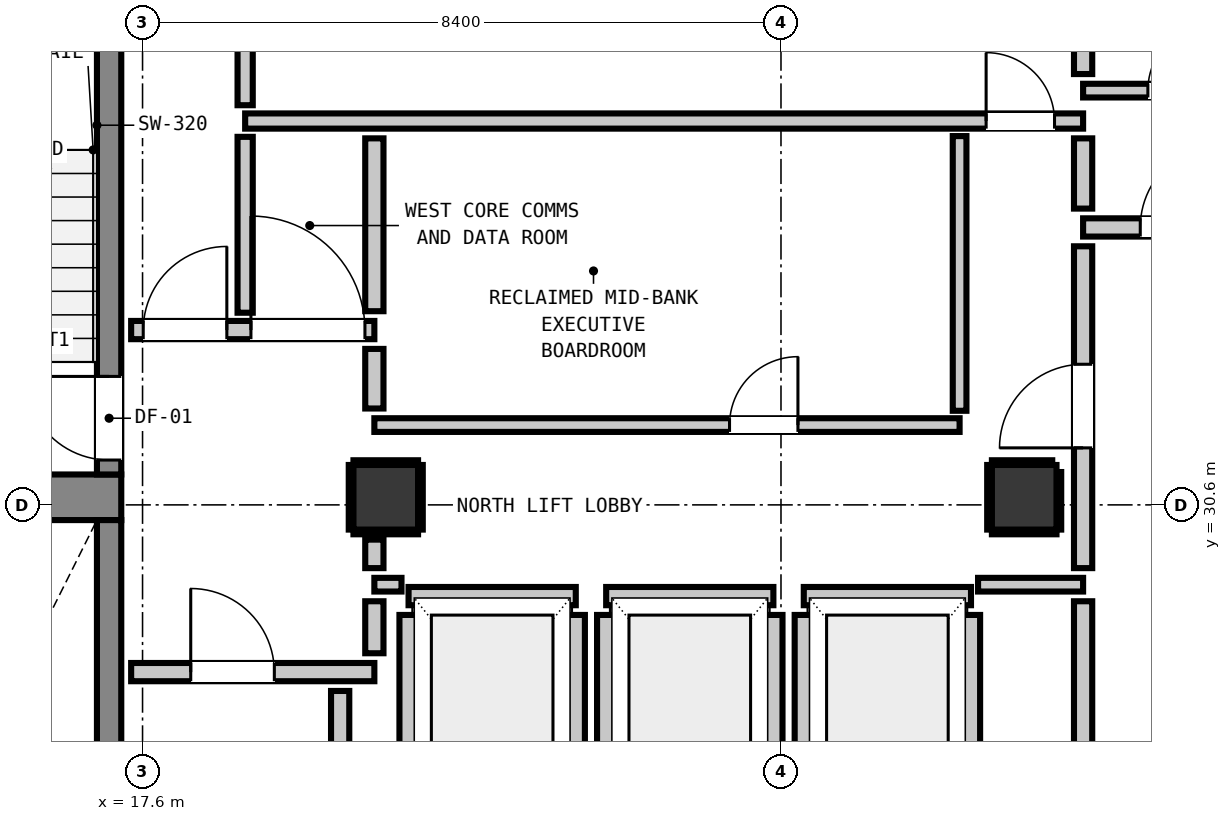
"""IFC4 building model, lengths in metres.
Left out: names, types, materials, properties, quantities, classifications, styles, units other than length and angle.
Written with IfcOpenShell. Run it as: python <this file> out.ifc"""

import sys

from ifc_helpers import new_model, si_unit, direction, frame, frame_2d, origin, origin_2d, place, context, subcontext, project, spatial, rectangle, extrude, element, fill, save


model = new_model("IFC4")
c1 = context("Model", 3, precision=1e-05, world=origin(), true_north=direction((0.0, 1.0)))
c2 = subcontext(c1, "Body", "Model", "MODEL_VIEW")
j1 = project(units=[si_unit("LENGTHUNIT", "METRE"), si_unit("PLANEANGLEUNIT", "RADIAN")], contexts=[c1])
p1 = place(None, origin())
s1 = spatial("IfcSite", under=j1, at=p1, CompositionType="ELEMENT")
p2 = place(p1, origin())
s2 = spatial("IfcBuilding", under=s1, at=p2, CompositionType="ELEMENT")
p3 = place(p2, frame((0.0, 0.0, 190.16)))
s3 = spatial("IfcBuildingStorey", under=s2, at=p3, CompositionType="ELEMENT", Elevation=190.16)
p4 = place(p3, frame((13.78, 30.7, 0.0), z_axis=(0.0, 0.0, 1.0), x_axis=(1.0, 0.0, 0.0)))
e1 = element("IfcWall", 1, at=p4, inside=s3, PredefinedType="SHEAR", context=c2, shape_type="SweptSolid", body=[
    extrude(rectangle(XDim=3.54, YDim=0.6, at=frame_2d((1.77, 0.0))), origin(), (0.0, 0.0, 1.0), 3.32),
])
p5 = place(p3, frame((17.16, 31.0, 0.0), z_axis=(0.0, 0.0, 1.0), x_axis=(0.0, 1.0, 0.0)))
e2 = element("IfcWall", 2, at=p5, inside=s3, PredefinedType="SHEAR", context=c2, shape_type="SweptSolid", body=[
    extrude(rectangle(XDim=7.8, YDim=0.32, at=frame_2d((3.9, 0.0))), origin(), (0.0, 0.0, 1.0), 3.32),
])
p6 = place(p5, frame((0.19, 0.0, 0.0)))
e3 = element("IfcOpeningElement", 3, at=p6, cuts=e2, PredefinedType="OPENING", context=c2, shape_type="SweptSolid", body=[
    extrude(rectangle(XDim=1.1, YDim=2.15, at=frame_2d((0.55, 1.075))), frame((0.0, 0.17, 0.0), z_axis=(0.0, -1.0, 0.0), x_axis=(1.0, 0.0, 0.0)), (0.0, 0.0, 1.0), 0.34),
])
p7 = place(p3, frame((17.16, 22.4, 0.0), z_axis=(0.0, 0.0, 1.0), x_axis=(0.0, 1.0, 0.0)))
e4 = element("IfcWall", 4, at=p7, inside=s3, PredefinedType="SHEAR", context=c2, shape_type="SweptSolid", body=[
    extrude(rectangle(XDim=8.0, YDim=0.32, at=frame_2d((4.0, 0.0))), origin(), (0.0, 0.0, 1.0), 3.32),
])
p8 = place(p7, frame((0.39, 0.0, 0.0)))
e5 = element("IfcOpeningElement", 5, at=p8, cuts=e4, PredefinedType="OPENING", context=c2, shape_type="SweptSolid", body=[
    extrude(rectangle(XDim=1.1, YDim=2.15, at=frame_2d((0.55, 1.075))), frame((0.0, 0.17, 0.0), z_axis=(0.0, -1.0, 0.0), x_axis=(1.0, 0.0, 0.0)), (0.0, 0.0, 1.0), 0.34),
])
for number, where, z_axis, x_axis in (
    (6, (20.8, 30.7, 0.0), (0.0, 0.0, 1.0), (1.0, 0.0, 0.0)),
    (7, (29.2, 30.7, 0.0), (0.0, 0.0, 1.0), (1.0, 0.0, 0.0)),
):
    element("IfcColumn", number, at=place(p3, frame(where, z_axis=z_axis, x_axis=x_axis)), inside=s3, PredefinedType="COLUMN", context=c2, shape_type="SweptSolid", body=[
        extrude(rectangle(XDim=0.85, YDim=0.85, at=origin_2d()), origin(), (0.0, 0.0, 1.0), 3.32),
    ])
p9 = place(p3, frame((21.1, 29.4, 0.0), z_axis=(0.0, 0.0, 1.0), x_axis=(1.0, 0.0, 0.0)))
e8 = element("IfcWall", 8, at=p9, inside=s3, PredefinedType="PARTITIONING", context=c2, shape_type="SweptSolid", body=[
    extrude(rectangle(XDim=2.2, YDim=0.24, at=frame_2d((1.1, 0.0))), origin(), (0.0, 0.0, 1.0), 3.1),
])
p10 = place(p3, frame((21.1, 27.048, 0.0), z_axis=(0.0, 0.0, 1.0), x_axis=(0.0, 1.0, 0.0)))
e9 = element("IfcWall", 9, at=p10, inside=s3, PredefinedType="PARTITIONING", context=c2, shape_type="SweptSolid", body=[
    extrude(rectangle(XDim=2.104, YDim=0.24, at=frame_2d((1.052, 0.0))), origin(), (0.0, 0.0, 1.0), 2.335),
])
p11 = place(p3, frame((23.3, 27.048, 0.0), z_axis=(0.0, 0.0, 1.0), x_axis=(0.0, 1.0, 0.0)))
e10 = element("IfcWall", 10, at=p11, inside=s3, PredefinedType="PARTITIONING", context=c2, shape_type="SweptSolid", body=[
    extrude(rectangle(XDim=2.104, YDim=0.24, at=frame_2d((1.052, 0.0))), origin(), (0.0, 0.0, 1.0), 3.1),
])
p12 = place(p3, frame((23.7, 29.4, 0.0), z_axis=(0.0, 0.0, 1.0), x_axis=(1.0, 0.0, 0.0)))
e11 = element("IfcWall", 11, at=p12, inside=s3, PredefinedType="PARTITIONING", context=c2, shape_type="SweptSolid", body=[
    extrude(rectangle(XDim=2.2, YDim=0.24, at=frame_2d((1.1, 0.0))), origin(), (0.0, 0.0, 1.0), 3.1),
])
for number, where, z_axis, x_axis in (
    (12, (23.7, 27.048, 0.0), (0.0, 0.0, 1.0), (0.0, 1.0, 0.0)),
    (13, (25.9, 27.048, 0.0), (0.0, 0.0, 1.0), (0.0, 1.0, 0.0)),
):
    element("IfcWall", number, at=place(p3, frame(where, z_axis=z_axis, x_axis=x_axis)), inside=s3, PredefinedType="PARTITIONING", context=c2, shape_type="SweptSolid", body=[
        extrude(rectangle(XDim=2.104, YDim=0.24, at=frame_2d((1.052, 0.0))), origin(), (0.0, 0.0, 1.0), 3.1),
    ])
p13 = place(p3, frame((26.3, 29.4, 0.0), z_axis=(0.0, 0.0, 1.0), x_axis=(1.0, 0.0, 0.0)))
e14 = element("IfcWall", 14, at=p13, inside=s3, PredefinedType="PARTITIONING", context=c2, shape_type="SweptSolid", body=[
    extrude(rectangle(XDim=2.2, YDim=0.24, at=frame_2d((1.1, 0.0))), origin(), (0.0, 0.0, 1.0), 3.1),
])
p14 = place(p3, frame((26.3, 27.048, 0.0), z_axis=(0.0, 0.0, 1.0), x_axis=(0.0, 1.0, 0.0)))
e15 = element("IfcWall", 15, at=p14, inside=s3, PredefinedType="PARTITIONING", context=c2, shape_type="SweptSolid", body=[
    extrude(rectangle(XDim=2.104, YDim=0.24, at=frame_2d((1.052, 0.0))), origin(), (0.0, 0.0, 1.0), 3.1),
])
p15 = place(p3, frame((28.5, 27.33, 0.0), z_axis=(0.0, 0.0, 1.0), x_axis=(0.0, 1.0, 0.0)))
e16 = element("IfcWall", 16, at=p15, inside=s3, PredefinedType="PARTITIONING", context=c2, shape_type="SweptSolid", body=[
    extrude(rectangle(XDim=1.822, YDim=0.24, at=frame_2d((0.911, 0.0))), origin(), (0.0, 0.0, 1.0), 3.1),
])
p16 = place(p3, frame((17.45, 28.4, 0.0), z_axis=(0.0, 0.0, 1.0), x_axis=(1.0, 0.0, 0.0)))
e17 = element("IfcWall", 17, at=p16, inside=s3, PredefinedType="PARTITIONING", context=c2, shape_type="SweptSolid", body=[
    extrude(rectangle(XDim=3.2, YDim=0.24, at=frame_2d((1.6, 0.0))), origin(), (0.0, 0.0, 1.0), 3.1),
])
p17 = place(p16, frame((0.784, 0.0, 0.0)))
e18 = element("IfcOpeningElement", 18, at=p17, cuts=e17, PredefinedType="OPENING", context=c2, shape_type="SweptSolid", body=[
    extrude(rectangle(XDim=1.1, YDim=2.15, at=frame_2d((0.55, 1.075))), frame((0.0, 0.13, 0.0), z_axis=(0.0, -1.0, 0.0), x_axis=(1.0, 0.0, 0.0)), (0.0, 0.0, 1.0), 0.26),
])
p18 = place(p3, frame((17.45, 32.9, 0.0), z_axis=(0.0, 0.0, 1.0), x_axis=(1.0, 0.0, 0.0)))
e19 = element("IfcWall", 19, at=p18, inside=s3, PredefinedType="PARTITIONING", context=c2, shape_type="SweptSolid", body=[
    extrude(rectangle(XDim=3.2, YDim=0.24, at=frame_2d((1.6, 0.0))), origin(), (0.0, 0.0, 1.0), 3.1),
])
p19 = place(p18, frame((0.159, 0.0, 0.0)))
e20 = element("IfcOpeningElement", 20, at=p19, cuts=e19, PredefinedType="OPENING", context=c2, shape_type="SweptSolid", body=[
    extrude(rectangle(XDim=1.1, YDim=2.15, at=frame_2d((0.55, 1.075))), frame((0.0, 0.13, 0.0), z_axis=(0.0, -1.0, 0.0), x_axis=(1.0, 0.0, 0.0)), (0.0, 0.0, 1.0), 0.26),
])
p20 = place(p18, frame((1.576, 0.0, 0.0)))
e21 = element("IfcOpeningElement", 21, at=p20, cuts=e19, PredefinedType="OPENING", context=c2, shape_type="SweptSolid", body=[
    extrude(rectangle(XDim=1.5, YDim=2.15, at=frame_2d((0.75, 1.075))), frame((0.0, 0.13, 0.0), z_axis=(0.0, -1.0, 0.0), x_axis=(1.0, 0.0, 0.0)), (0.0, 0.0, 1.0), 0.26),
])
p21 = place(p3, frame((29.975, 34.25, 0.0), z_axis=(0.0, 0.0, 1.0), x_axis=(1.0, 0.0, 0.0)))
e22 = element("IfcWall", 22, at=p21, inside=s3, PredefinedType="PARTITIONING", context=c2, shape_type="SweptSolid", body=[
    extrude(rectangle(XDim=2.475, YDim=0.24, at=frame_2d((1.237, 0.0))), origin(), (0.0, 0.0, 1.0), 3.1),
])
p22 = place(p21, frame((0.752, 0.0, 0.0)))
e23 = element("IfcOpeningElement", 23, at=p22, cuts=e22, PredefinedType="OPENING", context=c2, shape_type="SweptSolid", body=[
    extrude(rectangle(XDim=1.1, YDim=2.15, at=frame_2d((0.55, 1.075))), frame((0.0, 0.13, 0.0), z_axis=(0.0, -1.0, 0.0), x_axis=(1.0, 0.0, 0.0)), (0.0, 0.0, 1.0), 0.26),
])
p23 = place(p3, frame((18.95, 35.65, 0.0), z_axis=(0.0, 0.0, 1.0), x_axis=(1.0, 0.0, 0.0)))
e24 = element("IfcWall", 24, at=p23, inside=s3, PredefinedType="PARTITIONING", context=c2, shape_type="SweptSolid", body=[
    extrude(rectangle(XDim=11.025, YDim=0.2, at=frame_2d((5.513, 0.0))), origin(), (0.0, 0.0, 1.0), 3.1),
])
p24 = place(p23, frame((9.749, 0.0, 0.0)))
e25 = element("IfcOpeningElement", 25, at=p24, cuts=e24, PredefinedType="OPENING", context=c2, shape_type="SweptSolid", body=[
    extrude(rectangle(XDim=0.9, YDim=2.1, at=frame_2d((0.45, 1.05))), frame((0.0, 0.11, 0.0), z_axis=(0.0, -1.0, 0.0), x_axis=(1.0, 0.0, 0.0)), (0.0, 0.0, 1.0), 0.22),
])
p25 = place(p3, frame((20.65, 29.55, 0.0), z_axis=(0.0, 0.0, 1.0), x_axis=(1.0, 0.0, 0.0)))
e26 = element("IfcWall", 26, at=p25, inside=s3, PredefinedType="PARTITIONING", context=c2, shape_type="SweptSolid", body=[
    extrude(rectangle(XDim=0.357, YDim=0.18, at=frame_2d((0.179, 0.0))), origin(), (0.0, 0.0, 1.0), 3.1),
])
p26 = place(p3, frame((28.593, 29.55, 0.0), z_axis=(0.0, 0.0, 1.0), x_axis=(1.0, 0.0, 0.0)))
e27 = element("IfcWall", 27, at=p26, inside=s3, PredefinedType="PARTITIONING", context=c2, shape_type="SweptSolid", body=[
    extrude(rectangle(XDim=1.382, YDim=0.18, at=frame_2d((0.691, 0.0))), origin(), (0.0, 0.0, 1.0), 3.1),
])
p27 = place(p3, frame((20.65, 31.65, 0.0), z_axis=(0.0, 0.0, 1.0), x_axis=(1.0, 0.0, 0.0)))
e28 = element("IfcWall", 28, at=p27, inside=s3, PredefinedType="PARTITIONING", context=c2, shape_type="SweptSolid", body=[
    extrude(rectangle(XDim=7.7, YDim=0.18, at=frame_2d((3.85, 0.0))), origin(), (0.0, 0.0, 1.0), 3.1),
])
p28 = place(p27, frame((4.673, 0.0, 0.0)))
e29 = element("IfcOpeningElement", 29, at=p28, cuts=e28, PredefinedType="OPENING", context=c2, shape_type="SweptSolid", body=[
    extrude(rectangle(XDim=0.9, YDim=2.1, at=frame_2d((0.45, 1.05))), frame((0.0, 0.1, 0.0), z_axis=(0.0, -1.0, 0.0), x_axis=(1.0, 0.0, 0.0)), (0.0, 0.0, 1.0), 0.2),
])
p29 = place(p3, frame((29.975, 36.05, 0.0), z_axis=(0.0, 0.0, 1.0), x_axis=(1.0, 0.0, 0.0)))
e30 = element("IfcWall", 30, at=p29, inside=s3, PredefinedType="PARTITIONING", context=c2, shape_type="SweptSolid", body=[
    extrude(rectangle(XDim=2.505, YDim=0.18, at=frame_2d((1.252, 0.0))), origin(), (0.0, 0.0, 1.0), 3.1),
])
p30 = place(p29, frame((0.852, 0.0, 0.0)))
e31 = element("IfcOpeningElement", 31, at=p30, cuts=e30, PredefinedType="OPENING", context=c2, shape_type="SweptSolid", body=[
    extrude(rectangle(XDim=0.9, YDim=2.1, at=frame_2d((0.45, 1.05))), frame((0.0, 0.1, 0.0), z_axis=(0.0, -1.0, 0.0), x_axis=(1.0, 0.0, 0.0)), (0.0, 0.0, 1.0), 0.2),
])
p31 = place(p3, frame((20.2, 21.398, 0.0), z_axis=(0.0, 0.0, 1.0), x_axis=(0.0, 1.0, 0.0)))
e32 = element("IfcWall", 32, at=p31, inside=s3, PredefinedType="PARTITIONING", context=c2, shape_type="SweptSolid", body=[
    extrude(rectangle(XDim=6.754, YDim=0.24, at=frame_2d((3.377, 0.0))), origin(), (0.0, 0.0, 1.0), 3.1),
])
p32 = place(p3, frame((20.65, 28.648, 0.0), z_axis=(0.0, 0.0, 1.0), x_axis=(0.0, 1.0, 0.0)))
e33 = element("IfcWall", 33, at=p32, inside=s3, PredefinedType="PARTITIONING", context=c2, shape_type="SweptSolid", body=[
    extrude(rectangle(XDim=0.684, YDim=0.24, at=frame_2d((0.342, 0.0))), origin(), (0.0, 0.0, 1.0), 2.335),
])
p33 = place(p3, frame((20.65, 29.768, 0.0), z_axis=(0.0, 0.0, 1.0), x_axis=(0.0, 1.0, 0.0)))
e34 = element("IfcWall", 34, at=p33, inside=s3, PredefinedType="PARTITIONING", context=c2, shape_type="SweptSolid", body=[
    extrude(rectangle(XDim=0.375, YDim=0.24, at=frame_2d((0.188, 0.0))), origin(), (0.0, 0.0, 1.0), 2.335),
])
p34 = place(p3, frame((20.65, 31.868, 0.0), z_axis=(0.0, 0.0, 1.0), x_axis=(0.0, 1.0, 0.0)))
e35 = element("IfcWall", 35, at=p34, inside=s3, PredefinedType="PARTITIONING", context=c2, shape_type="SweptSolid", body=[
    extrude(rectangle(XDim=0.784, YDim=0.24, at=frame_2d((0.392, 0.0))), origin(), (0.0, 0.0, 1.0), 2.335),
])
p35 = place(p3, frame((20.65, 33.148, 0.0), z_axis=(0.0, 0.0, 1.0), x_axis=(0.0, 1.0, 0.0)))
e36 = element("IfcWall", 36, at=p35, inside=s3, PredefinedType="PARTITIONING", context=c2, shape_type="SweptSolid", body=[
    extrude(rectangle(XDim=2.274, YDim=0.24, at=frame_2d((1.137, 0.0))), origin(), (0.0, 0.0, 1.0), 2.335),
])
p36 = place(p3, frame((29.975, 25.648, 0.0), z_axis=(0.0, 0.0, 1.0), x_axis=(0.0, 1.0, 0.0)))
e37 = element("IfcWall", 37, at=p36, inside=s3, PredefinedType="PARTITIONING", context=c2, shape_type="SweptSolid", body=[
    extrude(rectangle(XDim=3.684, YDim=0.24, at=frame_2d((1.842, 0.0))), origin(), (0.0, 0.0, 1.0), 3.1),
])
p37 = place(p3, frame((29.975, 29.768, 0.0), z_axis=(0.0, 0.0, 1.0), x_axis=(0.0, 1.0, 0.0)))
e38 = element("IfcWall", 38, at=p37, inside=s3, PredefinedType="PARTITIONING", context=c2, shape_type="SweptSolid", body=[
    extrude(rectangle(XDim=4.234, YDim=0.24, at=frame_2d((2.117, 0.0))), origin(), (0.0, 0.0, 1.0), 3.1),
])
p38 = place(p37, frame((1.582, 0.0, 0.0)))
e39 = element("IfcOpeningElement", 39, at=p38, cuts=e38, PredefinedType="OPENING", context=c2, shape_type="SweptSolid", body=[
    extrude(rectangle(XDim=1.1, YDim=2.15, at=frame_2d((0.55, 1.075))), frame((0.0, 0.13, 0.0), z_axis=(0.0, -1.0, 0.0), x_axis=(1.0, 0.0, 0.0)), (0.0, 0.0, 1.0), 0.26),
])
p39 = place(p3, frame((29.975, 34.498, 0.0), z_axis=(0.0, 0.0, 1.0), x_axis=(0.0, 1.0, 0.0)))
e40 = element("IfcWall", 40, at=p39, inside=s3, PredefinedType="PARTITIONING", context=c2, shape_type="SweptSolid", body=[
    extrude(rectangle(XDim=0.924, YDim=0.24, at=frame_2d((0.462, 0.0))), origin(), (0.0, 0.0, 1.0), 3.1),
])
p40 = place(p3, frame((29.975, 36.268, 0.0), z_axis=(0.0, 0.0, 1.0), x_axis=(0.0, 1.0, 0.0)))
e41 = element("IfcWall", 41, at=p40, inside=s3, PredefinedType="PARTITIONING", context=c2, shape_type="SweptSolid", body=[
    extrude(rectangle(XDim=2.294, YDim=0.24, at=frame_2d((1.147, 0.0))), origin(), (0.0, 0.0, 1.0), 3.1),
])
p41 = place(p3, frame((18.95, 33.128, 0.0), z_axis=(0.0, 0.0, 1.0), x_axis=(0.0, 1.0, 0.0)))
e42 = element("IfcWall", 42, at=p41, inside=s3, PredefinedType="PARTITIONING", context=c2, shape_type="SweptSolid", body=[
    extrude(rectangle(XDim=2.314, YDim=0.2, at=frame_2d((1.157, 0.0))), origin(), (0.0, 0.0, 1.0), 3.1),
])
p42 = place(p3, frame((18.95, 35.858, 0.0), z_axis=(0.0, 0.0, 1.0), x_axis=(0.0, 1.0, 0.0)))
e43 = element("IfcWall", 43, at=p42, inside=s3, PredefinedType="PARTITIONING", context=c2, shape_type="SweptSolid", body=[
    extrude(rectangle(XDim=2.724, YDim=0.2, at=frame_2d((1.362, 0.0))), origin(), (0.0, 0.0, 1.0), 3.1),
])
p43 = place(p3, frame((28.35, 31.838, 0.0), z_axis=(0.0, 0.0, 1.0), x_axis=(0.0, 1.0, 0.0)))
e44 = element("IfcWall", 44, at=p43, inside=s3, PredefinedType="PARTITIONING", context=c2, shape_type="SweptSolid", body=[
    extrude(rectangle(XDim=3.614, YDim=0.18, at=frame_2d((1.807, 0.0))), origin(), (0.0, 0.0, 1.0), 3.1),
])
for number, where, z_axis, x_axis in (
    (45, (20.375, 30.243, 0.0), (0.0, 0.0, 1.0), (1.0, 0.0, 0.0)),
    (46, (20.375, 31.157, 0.0), (0.0, 0.0, 1.0), (1.0, 0.0, 0.0)),
    (47, (20.343, 30.275, 0.0), (0.0, 0.0, 1.0), (0.0, 1.0, 0.0)),
    (48, (21.257, 30.275, 0.0), (0.0, 0.0, 1.0), (0.0, 1.0, 0.0)),
    (49, (28.775, 30.243, 0.0), (0.0, 0.0, 1.0), (1.0, 0.0, 0.0)),
):
    element("IfcWall", number, at=place(p3, frame(where, z_axis=z_axis, x_axis=x_axis)), inside=s3, PredefinedType="PARTITIONING", context=c2, shape_type="SweptSolid", body=[
        extrude(rectangle(XDim=0.85, YDim=0.06, at=frame_2d((0.425, 0.0))), origin(), (0.0, 0.0, 1.0), 1.45),
    ])
p44 = place(p3, frame((28.775, 31.157, 0.0), z_axis=(0.0, 0.0, 1.0), x_axis=(1.0, 0.0, 0.0)))
e50 = element("IfcWall", 50, at=p44, inside=s3, PredefinedType="PARTITIONING", context=c2, shape_type="SweptSolid", body=[
    extrude(rectangle(XDim=0.794, YDim=0.06, at=frame_2d((0.397, 0.0))), origin(), (0.0, 0.0, 1.0), 1.45),
])
p45 = place(p3, frame((28.743, 30.275, 0.0), z_axis=(0.0, 0.0, 1.0), x_axis=(0.0, 1.0, 0.0)))
e51 = element("IfcWall", 51, at=p45, inside=s3, PredefinedType="PARTITIONING", context=c2, shape_type="SweptSolid", body=[
    extrude(rectangle(XDim=0.85, YDim=0.06, at=frame_2d((0.425, 0.0))), origin(), (0.0, 0.0, 1.0), 1.45),
])
p46 = place(p3, frame((29.657, 30.275, 0.0), z_axis=(0.0, 0.0, 1.0), x_axis=(0.0, 1.0, 0.0)))
e52 = element("IfcWall", 52, at=p46, inside=s3, PredefinedType="PARTITIONING", context=c2, shape_type="SweptSolid", body=[
    extrude(rectangle(XDim=0.757, YDim=0.06, at=frame_2d((0.378, 0.0))), origin(), (0.0, 0.0, 1.0), 1.45),
])
p47 = place(p6, origin())
e53 = element("IfcDoor", 53, at=p47, inside=s3, OperationType="SINGLE_SWING_RIGHT", PredefinedType="DOOR", context=c2, shape_type="SweptSolid", body=[
    extrude(rectangle(XDim=1.1, YDim=2.15, at=frame_2d((0.55, 1.075))), frame((0.0, 0.025, 0.0), z_axis=(0.0, -1.0, 0.0), x_axis=(1.0, 0.0, 0.0)), (0.0, 0.0, 1.0), 0.05),
])
fill(e3, e53)
p48 = place(p17, origin())
e54 = element("IfcDoor", 54, at=p48, inside=s3, OperationType="SINGLE_SWING_LEFT", PredefinedType="DOOR", context=c2, shape_type="SweptSolid", body=[
    extrude(rectangle(XDim=1.1, YDim=2.15, at=frame_2d((0.55, 1.075))), frame((0.0, 0.025, 0.0), z_axis=(0.0, -1.0, 0.0), x_axis=(1.0, 0.0, 0.0)), (0.0, 0.0, 1.0), 0.05),
])
fill(e18, e54)
p49 = place(p19, origin())
e55 = element("IfcDoor", 55, at=p49, inside=s3, OperationType="SINGLE_SWING_RIGHT", PredefinedType="DOOR", context=c2, shape_type="SweptSolid", body=[
    extrude(rectangle(XDim=1.1, YDim=2.15, at=frame_2d((0.55, 1.075))), frame((0.0, 0.025, 0.0), z_axis=(0.0, -1.0, 0.0), x_axis=(1.0, 0.0, 0.0)), (0.0, 0.0, 1.0), 0.05),
])
fill(e20, e55)
p50 = place(p38, origin())
e56 = element("IfcDoor", 56, at=p50, inside=s3, OperationType="SINGLE_SWING_LEFT", PredefinedType="DOOR", context=c2, shape_type="SweptSolid", body=[
    extrude(rectangle(XDim=1.1, YDim=2.15, at=frame_2d((0.55, 1.075))), frame((0.0, 0.025, 0.0), z_axis=(0.0, -1.0, 0.0), x_axis=(1.0, 0.0, 0.0)), (0.0, 0.0, 1.0), 0.05),
])
fill(e39, e56)
p51 = place(p22, origin())
e57 = element("IfcDoor", 57, at=p51, inside=s3, OperationType="SINGLE_SWING_RIGHT", PredefinedType="DOOR", context=c2, shape_type="SweptSolid", body=[
    extrude(rectangle(XDim=1.1, YDim=2.15, at=frame_2d((0.55, 1.075))), frame((0.0, 0.025, 0.0), z_axis=(0.0, -1.0, 0.0), x_axis=(1.0, 0.0, 0.0)), (0.0, 0.0, 1.0), 0.05),
])
fill(e23, e57)
p52 = place(p20, origin())
e58 = element("IfcDoor", 58, at=p52, inside=s3, OperationType="SINGLE_SWING_LEFT", PredefinedType="DOOR", context=c2, shape_type="SweptSolid", body=[
    extrude(rectangle(XDim=1.5, YDim=2.15, at=frame_2d((0.75, 1.075))), frame((0.0, 0.025, 0.0), z_axis=(0.0, -1.0, 0.0), x_axis=(1.0, 0.0, 0.0)), (0.0, 0.0, 1.0), 0.05),
])
fill(e21, e58)
p53 = place(p30, origin())
e59 = element("IfcDoor", 59, at=p53, inside=s3, OperationType="SINGLE_SWING_RIGHT", PredefinedType="DOOR", context=c2, shape_type="SweptSolid", body=[
    extrude(rectangle(XDim=0.9, YDim=2.1, at=frame_2d((0.45, 1.05))), frame((0.0, 0.025, 0.0), z_axis=(0.0, -1.0, 0.0), x_axis=(1.0, 0.0, 0.0)), (0.0, 0.0, 1.0), 0.05),
])
fill(e31, e59)
p54 = place(p24, origin())
e60 = element("IfcDoor", 60, at=p54, inside=s3, OperationType="SINGLE_SWING_LEFT", PredefinedType="DOOR", context=c2, shape_type="SweptSolid", body=[
    extrude(rectangle(XDim=0.9, YDim=2.1, at=frame_2d((0.45, 1.05))), frame((0.0, 0.025, 0.0), z_axis=(0.0, -1.0, 0.0), x_axis=(1.0, 0.0, 0.0)), (0.0, 0.0, 1.0), 0.05),
])
fill(e25, e60)
p55 = place(p28, origin())
e61 = element("IfcDoor", 61, at=p55, inside=s3, OperationType="SINGLE_SWING_RIGHT", PredefinedType="DOOR", context=c2, shape_type="SweptSolid", body=[
    extrude(rectangle(XDim=0.9, YDim=2.1, at=frame_2d((0.45, 1.05))), frame((0.0, 0.025, 0.0), z_axis=(0.0, -1.0, 0.0), x_axis=(1.0, 0.0, 0.0)), (0.0, 0.0, 1.0), 0.05),
])
fill(e29, e61)
save(model, sys.argv[1])
